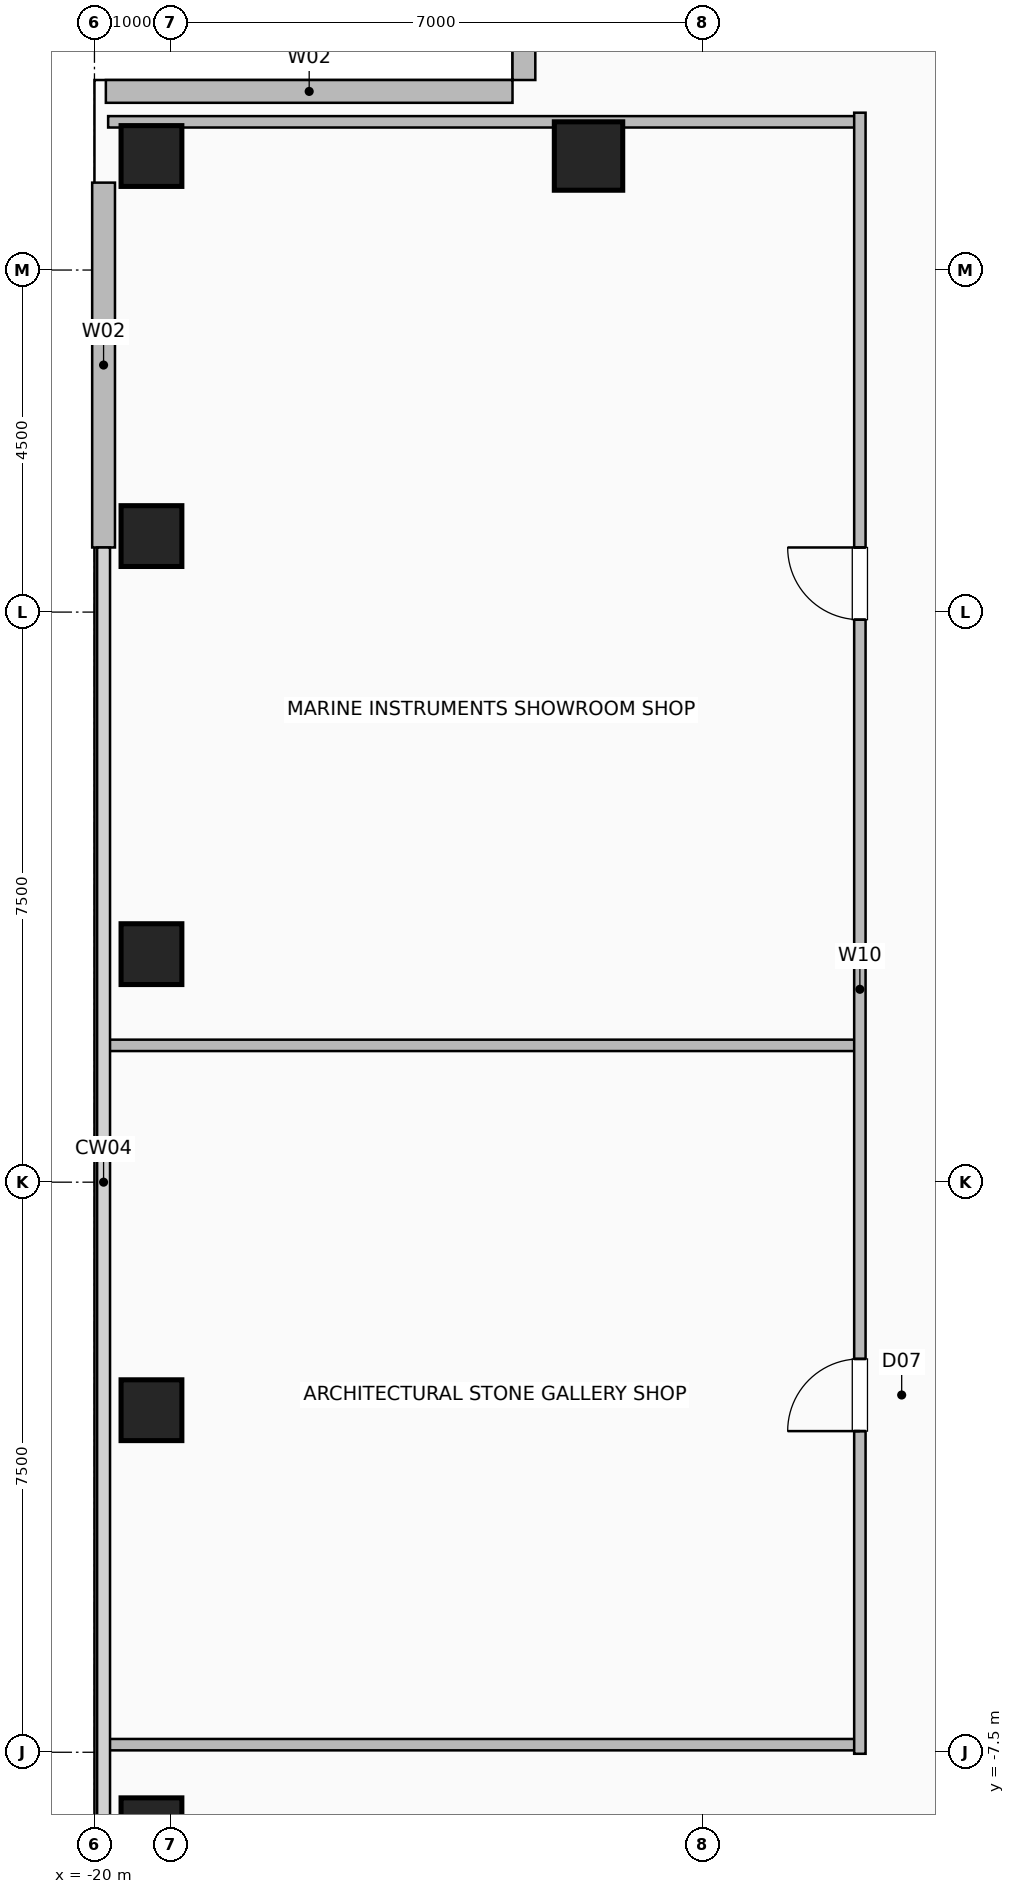
"""IFC4 building model, lengths in metres.
Left out: names, types, materials, properties, quantities, classifications, styles, units other than length and angle.
Written with IfcOpenShell. Run it as: python <this file> out.ifc"""

import sys

from ifc_helpers import new_model, si_unit, direction, frame, frame_2d, origin, origin_2d, place, context, subcontext, project, spatial, rectangle, hollow_rectangle, extrude, element, fill, save


model = new_model("IFC4")
c1 = context("Model", 3, precision=1e-05, world=origin(), true_north=direction((0.0, 1.0)))
c2 = subcontext(c1, "Body", "Model", "MODEL_VIEW")
j1 = project(units=[si_unit("LENGTHUNIT", "METRE"), si_unit("PLANEANGLEUNIT", "RADIAN")], contexts=[c1])
p1 = place(None, origin())
s1 = spatial("IfcSite", under=j1, at=p1, CompositionType="ELEMENT")
p2 = place(p1, origin())
s2 = spatial("IfcBuilding", under=s1, at=p2, CompositionType="ELEMENT")
p3 = place(p2, frame((0.0, 0.0, 223.8)))
s3 = spatial("IfcBuildingStorey", under=s2, at=p3, CompositionType="ELEMENT", Elevation=223.8)
for number, where, z_axis, x_axis in (
    (1, (-19.25, -8.5, 0.0), (0.0, 0.0, 1.0), (1.0, 0.0, 0.0)),
    (2, (-19.25, -3.0, 0.0), (0.0, 0.0, 1.0), (1.0, 0.0, 0.0)),
    (3, (-19.25, 3.0, 0.0), (0.0, 0.0, 1.0), (1.0, 0.0, 0.0)),
    (4, (-19.25, 8.5, 0.0), (0.0, 0.0, 1.0), (1.0, 0.0, 0.0)),
    (5, (-19.25, 13.5, 0.0), (0.0, 0.0, 1.0), (1.0, 0.0, 0.0)),
):
    element("IfcColumn", number, at=place(p3, frame(where, z_axis=z_axis, x_axis=x_axis)), inside=s3, PredefinedType="COLUMN", context=c2, shape_type="SweptSolid", body=[
        extrude(hollow_rectangle(XDim=0.8, YDim=0.8, WallThickness=0.04, at=origin_2d()), origin(), (0.0, 0.0, 1.0), 3.6),
    ])
p4 = place(p3, frame((-13.5, 13.5, 0.0), z_axis=(0.0, 0.0, 1.0), x_axis=(1.0, 0.0, 0.0)))
e6 = element("IfcColumn", 6, at=p4, inside=s3, PredefinedType="COLUMN", context=c2, shape_type="SweptSolid", body=[
    extrude(hollow_rectangle(XDim=0.9, YDim=0.9, WallThickness=0.045, at=origin_2d()), origin(), (0.0, 0.0, 1.0), 3.6),
])
p5 = place(p3, frame((-19.88, 8.35, 0.0), z_axis=(0.0, 0.0, 1.0), x_axis=(0.0, 1.0, 0.0)))
e7 = element("IfcWall", 7, at=p5, inside=s3, PredefinedType="SOLIDWALL", context=c2, shape_type="SweptSolid", body=[
    extrude(rectangle(XDim=4.8, YDim=0.3, at=frame_2d((2.4, 0.0))), origin(), (0.0, 0.0, 1.0), 3.25),
])
p6 = place(p3, frame((-14.35, 19.85, 0.0), z_axis=(0.0, 0.0, 1.0), x_axis=(0.0, -1.0, 0.0)))
e8 = element("IfcWall", 8, at=p6, inside=s3, PredefinedType="SOLIDWALL", context=c2, shape_type="SweptSolid", body=[
    extrude(rectangle(XDim=5.35, YDim=0.3, at=frame_2d((2.675, 0.0))), origin(), (0.0, 0.0, 1.0), 3.25),
])
p7 = place(p6, frame((1.925, 0.0, 0.9)))
e9 = element("IfcOpeningElement", 9, at=p7, cuts=e8, PredefinedType="OPENING", context=c2, shape_type="SweptSolid", body=[
    extrude(rectangle(XDim=1.5, YDim=1.8, at=frame_2d((0.75, 0.9))), frame((0.0, 0.16, 0.0), z_axis=(0.0, -1.0, 0.0), x_axis=(1.0, 0.0, 0.0)), (0.0, 0.0, 1.0), 0.32),
])
p8 = place(p3, frame((-19.85, 14.35, 0.0), z_axis=(0.0, 0.0, 1.0), x_axis=(1.0, 0.0, 0.0)))
e10 = element("IfcWall", 10, at=p8, inside=s3, PredefinedType="SOLIDWALL", context=c2, shape_type="SweptSolid", body=[
    extrude(rectangle(XDim=5.35, YDim=0.3, at=frame_2d((2.675, 0.0))), origin(), (0.0, 0.0, 1.0), 3.25),
])
for number, where, z_axis, x_axis in (
    (11, (-19.82, -7.4, 0.0), (0.0, 0.0, 1.0), (1.0, 0.0, 0.0)),
    (12, (-19.82, 1.8, 0.0), (0.0, 0.0, 1.0), (1.0, 0.0, 0.0)),
    (13, (-19.82, 13.95, 0.0), (0.0, 0.0, 1.0), (1.0, 0.0, 0.0)),
):
    element("IfcWall", number, at=place(p3, frame(where, z_axis=z_axis, x_axis=x_axis)), inside=s3, PredefinedType="PARTITIONING", context=c2, shape_type="SweptSolid", body=[
        extrude(rectangle(XDim=9.89, YDim=0.15, at=frame_2d((4.945, 0.0))), origin(), (0.0, 0.0, 1.0), 3.25),
    ])
p9 = place(p3, frame((-9.93, -7.52, 0.0), z_axis=(0.0, 0.0, 1.0), x_axis=(0.0, 1.0, 0.0)))
e14 = element("IfcWall", 14, at=p9, inside=s3, PredefinedType="PARTITIONING", context=c2, shape_type="SweptSolid", body=[
    extrude(rectangle(XDim=21.59, YDim=0.15, at=frame_2d((10.795, 0.0))), origin(), (0.0, 0.0, 1.0), 3.25),
])
p10 = place(p9, frame((4.245, 0.0, 0.0)))
e15 = element("IfcOpeningElement", 15, at=p10, cuts=e14, PredefinedType="OPENING", context=c2, shape_type="SweptSolid", body=[
    extrude(rectangle(XDim=0.95, YDim=2.06, at=frame_2d((0.475, 1.03))), frame((0.0, 0.085, 0.0), z_axis=(0.0, -1.0, 0.0), x_axis=(1.0, 0.0, 0.0)), (0.0, 0.0, 1.0), 0.17),
])
p11 = place(p9, frame((14.92, 0.0, 0.0)))
e16 = element("IfcOpeningElement", 16, at=p11, cuts=e14, PredefinedType="OPENING", context=c2, shape_type="SweptSolid", body=[
    extrude(rectangle(XDim=0.95, YDim=2.06, at=frame_2d((0.475, 1.03))), frame((0.0, 0.085, 0.0), z_axis=(0.0, -1.0, 0.0), x_axis=(1.0, 0.0, 0.0)), (0.0, 0.0, 1.0), 0.17),
])
p12 = place(p10, origin())
e17 = element("IfcDoor", 17, at=p12, inside=s3, OperationType="SINGLE_SWING_LEFT", PredefinedType="DOOR", context=c2, shape_type="SweptSolid", body=[
    extrude(rectangle(XDim=0.95, YDim=2.06, at=frame_2d((0.475, 1.03))), frame((0.0, 0.025, 0.0), z_axis=(0.0, -1.0, 0.0), x_axis=(1.0, 0.0, 0.0)), (0.0, 0.0, 1.0), 0.05),
])
fill(e15, e17)
p13 = place(p11, origin())
e18 = element("IfcDoor", 18, at=p13, inside=s3, OperationType="SINGLE_SWING_RIGHT", PredefinedType="DOOR", context=c2, shape_type="SweptSolid", body=[
    extrude(rectangle(XDim=0.95, YDim=2.06, at=frame_2d((0.475, 1.03))), frame((0.0, 0.025, 0.0), z_axis=(0.0, -1.0, 0.0), x_axis=(1.0, 0.0, 0.0)), (0.0, 0.0, 1.0), 0.05),
])
fill(e16, e18)
save(model, sys.argv[1])
